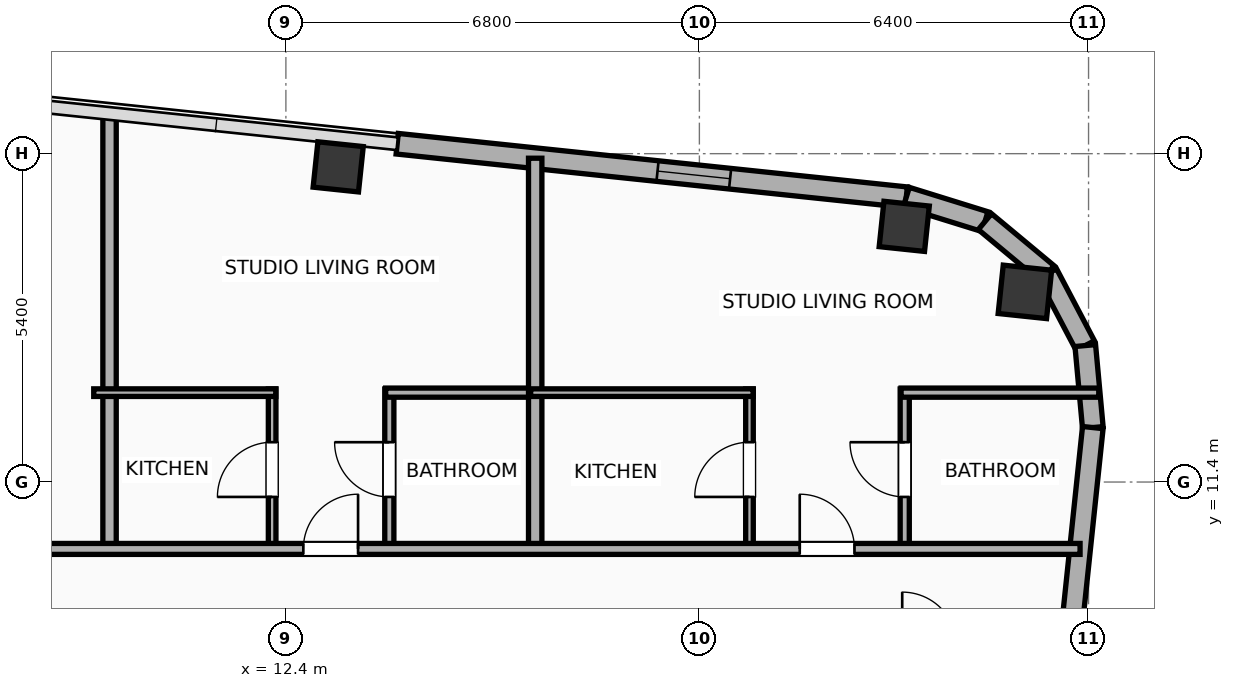
"""IFC4 building model, lengths in metres.
Left out: names, types, materials, properties, quantities, classifications, styles, units other than length and angle.
Written with IfcOpenShell. Run it as: python <this file> out.ifc"""

import sys

from ifc_helpers import new_model, si_unit, direction, frame, frame_2d, origin, origin_2d, place, context, subcontext, project, spatial, rectangle, hollow_rectangle, hollow_circle, extrude, element, fill, save


model = new_model("IFC4")
c1 = context("Model", 3, precision=1e-05, world=origin(), true_north=direction((0.0, 1.0)))
c2 = subcontext(c1, "Body", "Model", "MODEL_VIEW")
j1 = project(units=[si_unit("LENGTHUNIT", "METRE"), si_unit("PLANEANGLEUNIT", "RADIAN")], contexts=[c1])
p1 = place(None, origin())
s1 = spatial("IfcSite", under=j1, at=p1, CompositionType="ELEMENT")
p2 = place(p1, origin())
s2 = spatial("IfcBuilding", under=s1, at=p2, CompositionType="ELEMENT")
p3 = place(p2, frame((0.0, 0.0, 267.8)))
s3 = spatial("IfcBuildingStorey", under=s2, at=p3, CompositionType="ELEMENT", Elevation=267.8)
p4 = place(p3, frame((24.553, 14.527, 0.0), z_axis=(0.0, 0.0, 1.0), x_axis=(0.994521895368, -0.104528463268, 0.0)))
e1 = element("IfcColumn", 1, at=p4, inside=s3, PredefinedType="COLUMN", context=c2, shape_type="SweptSolid", body=[
    extrude(hollow_circle(Radius=0.4, WallThickness=0.028, at=origin_2d()), origin(), (0.0, 0.0, 1.0), 3.9),
])
for number, where, z_axis, x_axis in (
    (2, (22.569, 15.604, 0.0), (0.0, 0.0, 1.0), (0.995, -0.105, 0.0)),
    (3, (13.26, 16.583, 0.0), (0.0, 0.0, 1.0), (0.995, -0.105, 0.0)),
):
    element("IfcColumn", number, at=place(p3, frame(where, z_axis=z_axis, x_axis=x_axis)), inside=s3, PredefinedType="COLUMN", context=c2, shape_type="SweptSolid", body=[
        extrude(hollow_rectangle(XDim=0.75, YDim=0.75, WallThickness=0.025, at=origin_2d()), origin(), (0.0, 0.0, 1.0), 3.9),
    ])
p5 = place(p3, frame((14.231, 16.964, 0.0), z_axis=(0.0, 0.0, 1.0), x_axis=(0.994522285292, -0.104524753323, 0.0)))
e4 = element("IfcWall", 4, at=p5, inside=s3, PredefinedType="ELEMENTEDWALL", context=c2, shape_type="SweptSolid", body=[
    extrude(rectangle(XDim=8.418, YDim=0.34, at=frame_2d((4.209, 0.0))), origin(), (0.0, 0.0, 1.0), 3.65),
])
p6 = place(p5, frame((4.305, 0.0, 0.75)))
e5 = element("IfcOpeningElement", 5, at=p6, cuts=e4, PredefinedType="OPENING", context=c2, shape_type="SweptSolid", body=[
    extrude(rectangle(XDim=1.2, YDim=2.05, at=frame_2d((0.6, 1.025))), frame((0.0, 0.18, 0.0), z_axis=(0.0, -1.0, 0.0), x_axis=(1.0, 0.0, 0.0)), (0.0, 0.0, 1.0), 0.36),
])
p7 = place(p3, frame((22.603, 16.084, 0.0), z_axis=(0.0, 0.0, 1.0), x_axis=(0.955007802701, -0.296580674994, 0.0)))
e6 = element("IfcWall", 6, at=p7, inside=s3, PredefinedType="ELEMENTEDWALL", context=c2, shape_type="SweptSolid", body=[
    extrude(rectangle(XDim=1.354, YDim=0.34, at=frame_2d((0.677, 0.0))), origin(), (0.0, 0.0, 1.0), 3.65),
])
for number, where, z_axis, x_axis in (
    (7, (23.896, 15.682, 0.0), (0.0, 0.0, 1.0), (0.769, -0.64, 0.0)),
    (8, (24.924, 14.827, 0.0), (0.0, 0.0, 1.0), (0.466, -0.885, 0.0)),
):
    element("IfcWall", number, at=place(p3, frame(where, z_axis=z_axis, x_axis=x_axis)), inside=s3, PredefinedType="ELEMENTEDWALL", context=c2, shape_type="SweptSolid", body=[
        extrude(rectangle(XDim=1.337, YDim=0.34, at=frame_2d((0.668, 0.0))), origin(), (0.0, 0.0, 1.0), 3.65),
    ])
p8 = place(p3, frame((25.546, 13.644, 0.0), z_axis=(0.0, 0.0, 1.0), x_axis=(0.091592370975, -0.995796584438, 0.0)))
e9 = element("IfcWall", 9, at=p8, inside=s3, PredefinedType="ELEMENTEDWALL", context=c2, shape_type="SweptSolid", body=[
    extrude(rectangle(XDim=1.354, YDim=0.34, at=frame_2d((0.677, 0.0))), origin(), (0.0, 0.0, 1.0), 3.65),
])
p9 = place(p3, frame((25.67, 12.296, 0.0), z_axis=(0.0, 0.0, 1.0), x_axis=(-0.104533282919, -0.994521388791, 0.0)))
e10 = element("IfcWall", 10, at=p9, inside=s3, PredefinedType="ELEMENTEDWALL", context=c2, shape_type="SweptSolid", body=[
    extrude(rectangle(XDim=30.366, YDim=0.34, at=frame_2d((15.183, 0.0))), origin(), (0.0, 0.0, 1.0), 3.65),
])
p10 = place(p9, frame((5.842, 0.0, 0.75)))
e11 = element("IfcOpeningElement", 11, at=p10, cuts=e10, PredefinedType="OPENING", context=c2, shape_type="SweptSolid", body=[
    extrude(rectangle(XDim=1.8, YDim=2.1, at=frame_2d((0.9, 1.05))), frame((0.0, 0.18, 0.0), z_axis=(0.0, -1.0, 0.0), x_axis=(1.0, 0.0, 0.0)), (0.0, 0.0, 1.0), 0.36),
])
p11 = place(p9, frame((23.525, 0.0, 0.75)))
e12 = element("IfcOpeningElement", 12, at=p11, cuts=e10, PredefinedType="OPENING", context=c2, shape_type="SweptSolid", body=[
    extrude(rectangle(XDim=1.8, YDim=2.1, at=frame_2d((0.9, 1.05))), frame((0.0, 0.18, 0.0), z_axis=(0.0, -1.0, 0.0), x_axis=(1.0, 0.0, 0.0)), (0.0, 0.0, 1.0), 0.36),
])
p12 = place(p9, frame((27.117, 0.0, 0.75)))
e13 = element("IfcOpeningElement", 13, at=p12, cuts=e10, PredefinedType="OPENING", context=c2, shape_type="SweptSolid", body=[
    extrude(rectangle(XDim=1.2, YDim=2.05, at=frame_2d((0.6, 1.025))), frame((0.0, 0.18, 0.0), z_axis=(0.0, -1.0, 0.0), x_axis=(1.0, 0.0, 0.0)), (0.0, 0.0, 1.0), 0.36),
])
p13 = place(p9, frame((17.929, 0.0, 0.75)))
e14 = element("IfcOpeningElement", 14, at=p13, cuts=e10, PredefinedType="OPENING", context=c2, shape_type="SweptSolid", body=[
    extrude(rectangle(XDim=1.2, YDim=2.05, at=frame_2d((0.6, 1.025))), frame((0.0, 0.18, 0.0), z_axis=(0.0, -1.0, 0.0), x_axis=(1.0, 0.0, 0.0)), (0.0, 0.0, 1.0), 0.36),
])
p14 = place(p3, frame((9.5, 10.22, 0.0), z_axis=(0.0, 0.0, 1.0), x_axis=(0.0, 1.0, 0.0)))
e15 = element("IfcWall", 15, at=p14, inside=s3, PredefinedType="PARTITIONING", context=c2, shape_type="SweptSolid", body=[
    extrude(rectangle(XDim=7.241, YDim=0.22, at=frame_2d((3.621, 0.0))), origin(), (0.0, 0.0, 1.0), 3.65),
])
p15 = place(p3, frame((12.174, 10.28, 0.0), z_axis=(0.0, 0.0, 1.0), x_axis=(0.0, 1.0, 0.0)))
e16 = element("IfcWall", 16, at=p15, inside=s3, PredefinedType="PARTITIONING", context=c2, shape_type="SweptSolid", body=[
    extrude(rectangle(XDim=2.65, YDim=0.125, at=frame_2d((1.325, 0.0))), origin(), (0.0, 0.0, 1.0), 3.65),
])
p16 = place(p15, frame((0.875, 0.0, 0.0)))
e17 = element("IfcOpeningElement", 17, at=p16, cuts=e16, PredefinedType="OPENING", context=c2, shape_type="SweptSolid", body=[
    extrude(rectangle(XDim=0.9, YDim=2.05, at=frame_2d((0.45, 1.025))), frame((0.0, 0.073, 0.0), z_axis=(0.0, -1.0, 0.0), x_axis=(1.0, 0.0, 0.0)), (0.0, 0.0, 1.0), 0.145),
])
p17 = place(p3, frame((14.101, 10.28, 0.0), z_axis=(0.0, 0.0, 1.0), x_axis=(0.0, 1.0, 0.0)))
e18 = element("IfcWall", 18, at=p17, inside=s3, PredefinedType="PLUMBINGWALL", context=c2, shape_type="SweptSolid", body=[
    extrude(rectangle(XDim=2.65, YDim=0.15, at=frame_2d((1.325, 0.0))), origin(), (0.0, 0.0, 1.0), 3.65),
])
p18 = place(p17, frame((0.875, 0.0, 0.0)))
e19 = element("IfcOpeningElement", 19, at=p18, cuts=e18, PredefinedType="OPENING", context=c2, shape_type="SweptSolid", body=[
    extrude(rectangle(XDim=0.9, YDim=2.05, at=frame_2d((0.45, 1.025))), frame((0.0, 0.085, 0.0), z_axis=(0.0, -1.0, 0.0), x_axis=(1.0, 0.0, 0.0)), (0.0, 0.0, 1.0), 0.17),
])
p19 = place(p3, frame((9.24, 12.87, 0.0), z_axis=(0.0, 0.0, 1.0), x_axis=(1.0, 0.0, 0.0)))
e20 = element("IfcWall", 20, at=p19, inside=s3, PredefinedType="PARTITIONING", context=c2, shape_type="SweptSolid", body=[
    extrude(rectangle(XDim=2.994, YDim=0.125, at=frame_2d((1.497, 0.0))), origin(), (0.0, 0.0, 1.0), 3.65),
])
p20 = place(p3, frame((14.041, 12.87, 0.0), z_axis=(0.0, 0.0, 1.0), x_axis=(1.0, 0.0, 0.0)))
e21 = element("IfcWall", 21, at=p20, inside=s3, PredefinedType="PLUMBINGWALL", context=c2, shape_type="SweptSolid", body=[
    extrude(rectangle(XDim=2.534, YDim=0.15, at=frame_2d((1.267, 0.0))), origin(), (0.0, 0.0, 1.0), 3.65),
])
p21 = place(p3, frame((16.5, 10.22, 0.0), z_axis=(0.0, 0.0, 1.0), x_axis=(0.0, 1.0, 0.0)))
e22 = element("IfcWall", 22, at=p21, inside=s3, PredefinedType="PARTITIONING", context=c2, shape_type="SweptSolid", body=[
    extrude(rectangle(XDim=6.505, YDim=0.22, at=frame_2d((3.252, 0.0))), origin(), (0.0, 0.0, 1.0), 3.65),
])
p22 = place(p3, frame((20.024, 10.28, 0.0), z_axis=(0.0, 0.0, 1.0), x_axis=(0.0, 1.0, 0.0)))
e23 = element("IfcWall", 23, at=p22, inside=s3, PredefinedType="PARTITIONING", context=c2, shape_type="SweptSolid", body=[
    extrude(rectangle(XDim=2.65, YDim=0.125, at=frame_2d((1.325, 0.0))), origin(), (0.0, 0.0, 1.0), 3.65),
])
p23 = place(p22, frame((0.875, 0.0, 0.0)))
e24 = element("IfcOpeningElement", 24, at=p23, cuts=e23, PredefinedType="OPENING", context=c2, shape_type="SweptSolid", body=[
    extrude(rectangle(XDim=0.9, YDim=2.05, at=frame_2d((0.45, 1.025))), frame((0.0, 0.073, 0.0), z_axis=(0.0, -1.0, 0.0), x_axis=(1.0, 0.0, 0.0)), (0.0, 0.0, 1.0), 0.145),
])
p24 = place(p3, frame((22.577, 10.28, 0.0), z_axis=(0.0, 0.0, 1.0), x_axis=(0.0, 1.0, 0.0)))
e25 = element("IfcWall", 25, at=p24, inside=s3, PredefinedType="PLUMBINGWALL", context=c2, shape_type="SweptSolid", body=[
    extrude(rectangle(XDim=2.65, YDim=0.15, at=frame_2d((1.325, 0.0))), origin(), (0.0, 0.0, 1.0), 3.65),
])
p25 = place(p24, frame((0.875, 0.0, 0.0)))
e26 = element("IfcOpeningElement", 26, at=p25, cuts=e25, PredefinedType="OPENING", context=c2, shape_type="SweptSolid", body=[
    extrude(rectangle(XDim=0.9, YDim=2.05, at=frame_2d((0.45, 1.025))), frame((0.0, 0.085, 0.0), z_axis=(0.0, -1.0, 0.0), x_axis=(1.0, 0.0, 0.0)), (0.0, 0.0, 1.0), 0.17),
])
p26 = place(p3, frame((16.425, 12.87, 0.0), z_axis=(0.0, 0.0, 1.0), x_axis=(1.0, 0.0, 0.0)))
e27 = element("IfcWall", 27, at=p26, inside=s3, PredefinedType="PARTITIONING", context=c2, shape_type="SweptSolid", body=[
    extrude(rectangle(XDim=3.659, YDim=0.125, at=frame_2d((1.83, 0.0))), origin(), (0.0, 0.0, 1.0), 3.65),
])
p27 = place(p3, frame((22.517, 12.87, 0.0), z_axis=(0.0, 0.0, 1.0), x_axis=(1.0, 0.0, 0.0)))
e28 = element("IfcWall", 28, at=p27, inside=s3, PredefinedType="PLUMBINGWALL", context=c2, shape_type="SweptSolid", body=[
    extrude(rectangle(XDim=3.251, YDim=0.15, at=frame_2d((1.625, 0.0))), origin(), (0.0, 0.0, 1.0), 3.65),
])
p28 = place(p3, frame((-28.495, 10.3, 0.0), z_axis=(0.0, 0.0, 1.0), x_axis=(1.0, 0.0, 0.0)))
e29 = element("IfcWall", 29, at=p28, inside=s3, PredefinedType="PARTITIONING", context=c2, shape_type="SweptSolid", body=[
    extrude(rectangle(XDim=53.956, YDim=0.18, at=frame_2d((26.978, 0.0))), origin(), (0.0, 0.0, 1.0), 3.65),
])
p29 = place(p28, frame((4.772, 0.0, 0.0)))
e30 = element("IfcOpeningElement", 30, at=p29, cuts=e29, PredefinedType="OPENING", context=c2, shape_type="SweptSolid", body=[
    extrude(rectangle(XDim=1.15, YDim=2.05, at=frame_2d((0.575, 1.025))), frame((0.0, 0.1, 0.0), z_axis=(0.0, -1.0, 0.0), x_axis=(1.0, 0.0, 0.0)), (0.0, 0.0, 1.0), 0.2),
])
p30 = place(p28, frame((13.185, 0.0, 0.0)))
e31 = element("IfcOpeningElement", 31, at=p30, cuts=e29, PredefinedType="OPENING", context=c2, shape_type="SweptSolid", body=[
    extrude(rectangle(XDim=0.9, YDim=2.05, at=frame_2d((0.45, 1.025))), frame((0.0, 0.1, 0.0), z_axis=(0.0, -1.0, 0.0), x_axis=(1.0, 0.0, 0.0)), (0.0, 0.0, 1.0), 0.2),
])
p31 = place(p28, frame((21.196, 0.0, 0.0)))
e32 = element("IfcOpeningElement", 32, at=p31, cuts=e29, PredefinedType="OPENING", context=c2, shape_type="SweptSolid", body=[
    extrude(rectangle(XDim=1.15, YDim=2.05, at=frame_2d((0.575, 1.025))), frame((0.0, 0.1, 0.0), z_axis=(0.0, -1.0, 0.0), x_axis=(1.0, 0.0, 0.0)), (0.0, 0.0, 1.0), 0.2),
])
p32 = place(p28, frame((28.194, 0.0, 0.0)))
e33 = element("IfcOpeningElement", 33, at=p32, cuts=e29, PredefinedType="OPENING", context=c2, shape_type="SweptSolid", body=[
    extrude(rectangle(XDim=1.15, YDim=2.05, at=frame_2d((0.575, 1.025))), frame((0.0, 0.1, 0.0), z_axis=(0.0, -1.0, 0.0), x_axis=(1.0, 0.0, 0.0)), (0.0, 0.0, 1.0), 0.2),
])
p33 = place(p28, frame((33.919, 0.0, 0.0)))
e34 = element("IfcOpeningElement", 34, at=p33, cuts=e29, PredefinedType="OPENING", context=c2, shape_type="SweptSolid", body=[
    extrude(rectangle(XDim=1.15, YDim=2.05, at=frame_2d((0.575, 1.025))), frame((0.0, 0.1, 0.0), z_axis=(0.0, -1.0, 0.0), x_axis=(1.0, 0.0, 0.0)), (0.0, 0.0, 1.0), 0.2),
])
p34 = place(p28, frame((41.182, 0.0, 0.0)))
e35 = element("IfcOpeningElement", 35, at=p34, cuts=e29, PredefinedType="OPENING", context=c2, shape_type="SweptSolid", body=[
    extrude(rectangle(XDim=0.9, YDim=2.05, at=frame_2d((0.45, 1.025))), frame((0.0, 0.1, 0.0), z_axis=(0.0, -1.0, 0.0), x_axis=(1.0, 0.0, 0.0)), (0.0, 0.0, 1.0), 0.2),
])
p35 = place(p28, frame((49.346, 0.0, 0.0)))
e36 = element("IfcOpeningElement", 36, at=p35, cuts=e29, PredefinedType="OPENING", context=c2, shape_type="SweptSolid", body=[
    extrude(rectangle(XDim=0.9, YDim=2.05, at=frame_2d((0.45, 1.025))), frame((0.0, 0.1, 0.0), z_axis=(0.0, -1.0, 0.0), x_axis=(1.0, 0.0, 0.0)), (0.0, 0.0, 1.0), 0.2),
])
p36 = place(p6, origin())
e37 = element("IfcWindow", 37, at=p36, inside=s3, PartitioningType="SINGLE_PANEL", PredefinedType="WINDOW", context=c2, shape_type="SweptSolid", body=[
    extrude(rectangle(XDim=1.2, YDim=2.05, at=frame_2d((0.6, 1.025))), frame((0.0, 0.03, 0.0), z_axis=(0.0, -1.0, 0.0), x_axis=(1.0, 0.0, 0.0)), (0.0, 0.0, 1.0), 0.06),
])
fill(e5, e37)
p37 = place(p16, origin())
e38 = element("IfcDoor", 38, at=p37, inside=s3, OperationType="SINGLE_SWING_LEFT", PredefinedType="DOOR", context=c2, shape_type="SweptSolid", body=[
    extrude(rectangle(XDim=0.9, YDim=2.05, at=frame_2d((0.45, 1.025))), frame((0.0, 0.025, 0.0), z_axis=(0.0, -1.0, 0.0), x_axis=(1.0, 0.0, 0.0)), (0.0, 0.0, 1.0), 0.05),
])
fill(e17, e38)
p38 = place(p18, origin())
e39 = element("IfcDoor", 39, at=p38, inside=s3, OperationType="SINGLE_SWING_RIGHT", PredefinedType="DOOR", context=c2, shape_type="SweptSolid", body=[
    extrude(rectangle(XDim=0.9, YDim=2.05, at=frame_2d((0.45, 1.025))), frame((0.0, 0.025, 0.0), z_axis=(0.0, -1.0, 0.0), x_axis=(1.0, 0.0, 0.0)), (0.0, 0.0, 1.0), 0.05),
])
fill(e19, e39)
p39 = place(p23, origin())
e40 = element("IfcDoor", 40, at=p39, inside=s3, OperationType="SINGLE_SWING_LEFT", PredefinedType="DOOR", context=c2, shape_type="SweptSolid", body=[
    extrude(rectangle(XDim=0.9, YDim=2.05, at=frame_2d((0.45, 1.025))), frame((0.0, 0.025, 0.0), z_axis=(0.0, -1.0, 0.0), x_axis=(1.0, 0.0, 0.0)), (0.0, 0.0, 1.0), 0.05),
])
fill(e24, e40)
p40 = place(p25, origin())
e41 = element("IfcDoor", 41, at=p40, inside=s3, OperationType="SINGLE_SWING_RIGHT", PredefinedType="DOOR", context=c2, shape_type="SweptSolid", body=[
    extrude(rectangle(XDim=0.9, YDim=2.05, at=frame_2d((0.45, 1.025))), frame((0.0, 0.025, 0.0), z_axis=(0.0, -1.0, 0.0), x_axis=(1.0, 0.0, 0.0)), (0.0, 0.0, 1.0), 0.05),
])
fill(e26, e41)
p41 = place(p34, origin())
e42 = element("IfcDoor", 42, at=p41, inside=s3, OperationType="SINGLE_SWING_RIGHT", PredefinedType="DOOR", context=c2, shape_type="SweptSolid", body=[
    extrude(rectangle(XDim=0.9, YDim=2.05, at=frame_2d((0.45, 1.025))), frame((0.0, 0.025, 0.0), z_axis=(0.0, -1.0, 0.0), x_axis=(1.0, 0.0, 0.0)), (0.0, 0.0, 1.0), 0.05),
])
fill(e35, e42)
p42 = place(p35, origin())
e43 = element("IfcDoor", 43, at=p42, inside=s3, OperationType="SINGLE_SWING_LEFT", PredefinedType="DOOR", context=c2, shape_type="SweptSolid", body=[
    extrude(rectangle(XDim=0.9, YDim=2.05, at=frame_2d((0.45, 1.025))), frame((0.0, 0.025, 0.0), z_axis=(0.0, -1.0, 0.0), x_axis=(1.0, 0.0, 0.0)), (0.0, 0.0, 1.0), 0.05),
])
fill(e36, e43)
save(model, sys.argv[1])
